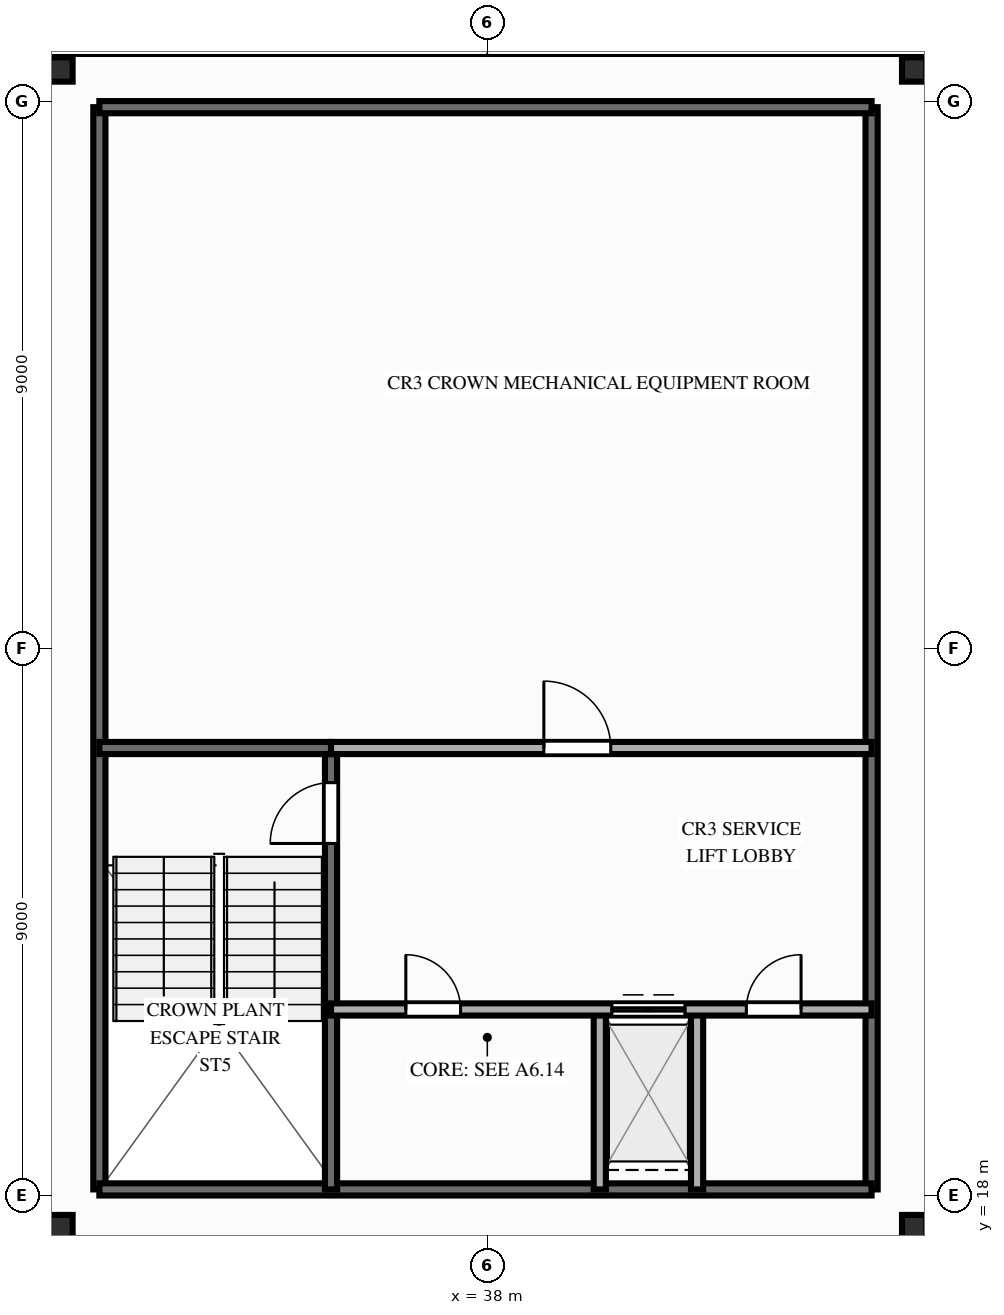
"""IFC4 building model, lengths in metres.
Left out: names, types, materials, properties, quantities, classifications, styles, units other than length and angle.
Written with IfcOpenShell. Run it as: python <this file> out.ifc"""

import sys

from ifc_helpers import new_model, si_unit, direction, frame, frame_2d, origin, origin_2d, place, context, subcontext, project, spatial, rectangle, i_section, extrude, source, transform, mapped, element, fill, save


model = new_model("IFC4")
c1 = context("Model", 3, precision=1e-05, world=origin(), true_north=direction((0.0, 1.0)))
c2 = subcontext(c1, "Body", "Model", "MODEL_VIEW")
j1 = project(units=[si_unit("LENGTHUNIT", "METRE"), si_unit("PLANEANGLEUNIT", "RADIAN")], contexts=[c1])
p1 = place(None, origin())
s1 = spatial("IfcSite", under=j1, at=p1, CompositionType="ELEMENT")
p2 = place(p1, origin())
s2 = spatial("IfcBuilding", under=s1, at=p2, CompositionType="ELEMENT")
p3 = place(p2, frame((0.0, 0.0, 259.8)))
s3 = spatial("IfcBuildingStorey", under=s2, at=p3, CompositionType="ELEMENT", Elevation=259.8)
m1 = source(origin(), c2, "Body", "SweptSolid", [
    extrude(i_section(OverallWidth=0.4, OverallDepth=0.4, WebThickness=0.013, FlangeThickness=0.021, at=origin_2d()), origin(), (0.0, 0.0, 1.0), 3.8),
])
for number, where, z_axis, x_axis in (
    (1, (30.98, 17.48, 0.0), (0.0, 0.0, 1.0), (1.0, 0.0, 0.0)),
    (2, (45.02, 17.48, 0.0), (0.0, 0.0, 1.0), (1.0, 0.0, 0.0)),
    (3, (30.98, 36.52, 0.0), (0.0, 0.0, 1.0), (1.0, 0.0, 0.0)),
    (4, (45.02, 36.52, 0.0), (0.0, 0.0, 1.0), (1.0, 0.0, 0.0)),
):
    element("IfcColumn", number, at=place(p3, frame(where, z_axis=z_axis, x_axis=x_axis)), inside=s3, PredefinedType="COLUMN", context=c2, shape_type="MappedRepresentation", body=[
        mapped(m1, transform((0.0, 0.0, 0.0), scale=1.0)),
    ])
for number, where, z_axis, x_axis in (
    (5, (31.62, 18.1, 0.0), (0.0, 0.0, 1.0), (0.0, 1.0, 0.0)),
    (6, (44.32, 18.1, 0.0), (0.0, 0.0, 1.0), (0.0, 1.0, 0.0)),
):
    element("IfcWall", number, at=place(p3, frame(where, z_axis=z_axis, x_axis=x_axis)), inside=s3, PredefinedType="SOLIDWALL", context=c2, shape_type="SweptSolid", body=[
        extrude(rectangle(XDim=17.8, YDim=0.2, at=frame_2d((8.9, 0.0))), origin(), (0.0, 0.0, 1.0), 3.55),
    ])
for number, where, z_axis, x_axis in (
    (7, (31.62, 18.1, 0.0), (0.0, 0.0, 1.0), (1.0, 0.0, 0.0)),
    (8, (31.62, 35.9, 0.0), (0.0, 0.0, 1.0), (1.0, 0.0, 0.0)),
):
    element("IfcWall", number, at=place(p3, frame(where, z_axis=z_axis, x_axis=x_axis)), inside=s3, PredefinedType="SOLIDWALL", context=c2, shape_type="SweptSolid", body=[
        extrude(rectangle(XDim=12.7, YDim=0.2, at=frame_2d((6.35, 0.0))), origin(), (0.0, 0.0, 1.0), 3.55),
    ])
p4 = place(p3, frame((35.43, 18.1, 0.0), z_axis=(0.0, 0.0, 1.0), x_axis=(0.0, 1.0, 0.0)))
e9 = element("IfcWall", 9, at=p4, inside=s3, PredefinedType="SOLIDWALL", context=c2, shape_type="SweptSolid", body=[
    extrude(rectangle(XDim=7.26, YDim=0.2, at=frame_2d((3.63, 0.0))), origin(), (0.0, 0.0, 1.0), 3.55),
])
p5 = place(p4, frame((6.69, 0.0, 0.0), z_axis=(0.0, 0.0, 1.0), x_axis=(-1.0, 0.0, 0.0)))
e10 = element("IfcOpeningElement", 10, at=p5, cuts=e9, PredefinedType="OPENING", context=c2, shape_type="SweptSolid", body=[
    extrude(rectangle(XDim=1.0, YDim=2.15, at=frame_2d((0.5, 1.075))), frame((0.0, 0.112, 0.0), z_axis=(0.0, -1.0, 0.0), x_axis=(1.0, 0.0, 0.0)), (0.0, 0.0, 1.0), 0.224),
])
p6 = place(p3, frame((31.62, 25.36, 0.0), z_axis=(0.0, 0.0, 1.0), x_axis=(1.0, 0.0, 0.0)))
e11 = element("IfcWall", 11, at=p6, inside=s3, PredefinedType="SOLIDWALL", context=c2, shape_type="SweptSolid", body=[
    extrude(rectangle(XDim=3.81, YDim=0.2, at=frame_2d((1.905, 0.0))), origin(), (0.0, 0.0, 1.0), 3.55),
])
for number, where, z_axis, x_axis in (
    (12, (39.85, 18.1, 0.0), (0.0, 0.0, 1.0), (0.0, 1.0, 0.0)),
    (13, (41.45, 18.1, 0.0), (0.0, 0.0, 1.0), (0.0, 1.0, 0.0)),
):
    element("IfcWall", number, at=place(p3, frame(where, z_axis=z_axis, x_axis=x_axis)), inside=s3, PredefinedType="PARTITIONING", context=c2, shape_type="SweptSolid", body=[
        extrude(rectangle(XDim=2.96, YDim=0.2, at=frame_2d((1.48, 0.0))), origin(), (0.0, 0.0, 1.0), 3.55),
    ])
p7 = place(p3, frame((35.43, 21.06, 0.0), z_axis=(0.0, 0.0, 1.0), x_axis=(1.0, 0.0, 0.0)))
e14 = element("IfcWall", 14, at=p7, inside=s3, PredefinedType="PARTITIONING", context=c2, shape_type="SweptSolid", body=[
    extrude(rectangle(XDim=8.89, YDim=0.2, at=frame_2d((4.445, 0.0))), origin(), (0.0, 0.0, 1.0), 3.55),
])
p8 = place(p7, frame((1.23, 0.0, 0.0)))
e15 = element("IfcOpeningElement", 15, at=p8, cuts=e14, PredefinedType="OPENING", context=c2, shape_type="SweptSolid", body=[
    extrude(rectangle(XDim=0.9, YDim=2.1, at=frame_2d((0.45, 1.05))), frame((0.0, 0.112, 0.0), z_axis=(0.0, -1.0, 0.0), x_axis=(1.0, 0.0, 0.0)), (0.0, 0.0, 1.0), 0.224),
])
p9 = place(p7, frame((4.62, 0.0, 0.0)))
e16 = element("IfcOpeningElement", 16, at=p9, cuts=e14, PredefinedType="OPENING", context=c2, shape_type="SweptSolid", body=[
    extrude(rectangle(XDim=1.2, YDim=2.15, at=frame_2d((0.6, 1.075))), frame((0.0, 0.112, 0.0), z_axis=(0.0, -1.0, 0.0), x_axis=(1.0, 0.0, 0.0)), (0.0, 0.0, 1.0), 0.224),
])
p10 = place(p7, frame((6.83, 0.0, 0.0)))
e17 = element("IfcOpeningElement", 17, at=p10, cuts=e14, PredefinedType="OPENING", context=c2, shape_type="SweptSolid", body=[
    extrude(rectangle(XDim=0.9, YDim=2.1, at=frame_2d((0.45, 1.05))), frame((0.0, 0.112, 0.0), z_axis=(0.0, -1.0, 0.0), x_axis=(1.0, 0.0, 0.0)), (0.0, 0.0, 1.0), 0.224),
])
p11 = place(p3, frame((35.43, 25.36, 0.0), z_axis=(0.0, 0.0, 1.0), x_axis=(1.0, 0.0, 0.0)))
e18 = element("IfcWall", 18, at=p11, inside=s3, PredefinedType="PARTITIONING", context=c2, shape_type="SweptSolid", body=[
    extrude(rectangle(XDim=8.89, YDim=0.2, at=frame_2d((4.445, 0.0))), origin(), (0.0, 0.0, 1.0), 2.952),
])
p12 = place(p11, frame((3.5, 0.0, 0.0)))
e19 = element("IfcOpeningElement", 19, at=p12, cuts=e18, PredefinedType="OPENING", context=c2, shape_type="SweptSolid", body=[
    extrude(rectangle(XDim=1.1, YDim=2.15, at=frame_2d((0.55, 1.075))), frame((0.0, 0.112, 0.0), z_axis=(0.0, -1.0, 0.0), x_axis=(1.0, 0.0, 0.0)), (0.0, 0.0, 1.0), 0.224),
])
m2 = source(origin(), c2, "Body", "SweptSolid", [
    extrude(rectangle(XDim=1.0, YDim=2.15, at=frame_2d((0.5, 1.075))), frame((0.0, 0.025, 0.0), z_axis=(0.0, -1.0, 0.0), x_axis=(1.0, 0.0, 0.0)), (0.0, 0.0, 1.0), 0.05),
])
p13 = place(p5, origin())
e20 = element("IfcDoor", 20, at=p13, inside=s3, OperationType="SINGLE_SWING_RIGHT", PredefinedType="DOOR", context=c2, shape_type="MappedRepresentation", body=[
    mapped(m2, transform((0.0, 0.0, 0.0), scale=1.0)),
])
fill(e10, e20)
m3 = source(origin(), c2, "Body", "SweptSolid", [
    extrude(rectangle(XDim=0.9, YDim=2.1, at=frame_2d((0.45, 1.05))), frame((0.0, 0.025, 0.0), z_axis=(0.0, -1.0, 0.0), x_axis=(1.0, 0.0, 0.0)), (0.0, 0.0, 1.0), 0.05),
])
p14 = place(p8, origin())
e21 = element("IfcDoor", 21, at=p14, inside=s3, OperationType="SINGLE_SWING_LEFT", PredefinedType="DOOR", context=c2, shape_type="MappedRepresentation", body=[
    mapped(m3, transform((0.0, 0.0, 0.0), scale=1.0)),
])
fill(e15, e21)
m4 = source(origin(), c2, "Body", "SweptSolid", [
    extrude(rectangle(XDim=1.2, YDim=2.15, at=frame_2d((0.6, 1.075))), frame((0.0, 0.025, 0.0), z_axis=(0.0, -1.0, 0.0), x_axis=(1.0, 0.0, 0.0)), (0.0, 0.0, 1.0), 0.05),
])
p15 = place(p9, origin())
e22 = element("IfcDoor", 22, at=p15, inside=s3, OperationType="DOUBLE_DOOR_SLIDING", PredefinedType="DOOR", context=c2, shape_type="MappedRepresentation", body=[
    mapped(m4, transform((0.0, 0.0, 0.0), scale=1.0)),
])
fill(e16, e22)
p16 = place(p10, origin())
e23 = element("IfcDoor", 23, at=p16, inside=s3, OperationType="SINGLE_SWING_RIGHT", PredefinedType="DOOR", context=c2, shape_type="MappedRepresentation", body=[
    mapped(m3, transform((0.0, 0.0, 0.0), scale=1.0)),
])
fill(e17, e23)
m5 = source(origin(), c2, "Body", "SweptSolid", [
    extrude(rectangle(XDim=1.1, YDim=2.15, at=frame_2d((0.55, 1.075))), frame((0.0, 0.025, 0.0), z_axis=(0.0, -1.0, 0.0), x_axis=(1.0, 0.0, 0.0)), (0.0, 0.0, 1.0), 0.05),
])
p17 = place(p12, origin())
e24 = element("IfcDoor", 24, at=p17, inside=s3, OperationType="SINGLE_SWING_LEFT", PredefinedType="DOOR", context=c2, shape_type="MappedRepresentation", body=[
    mapped(m5, transform((0.0, 0.0, 0.0), scale=1.0)),
])
fill(e19, e24)
save(model, sys.argv[1])
